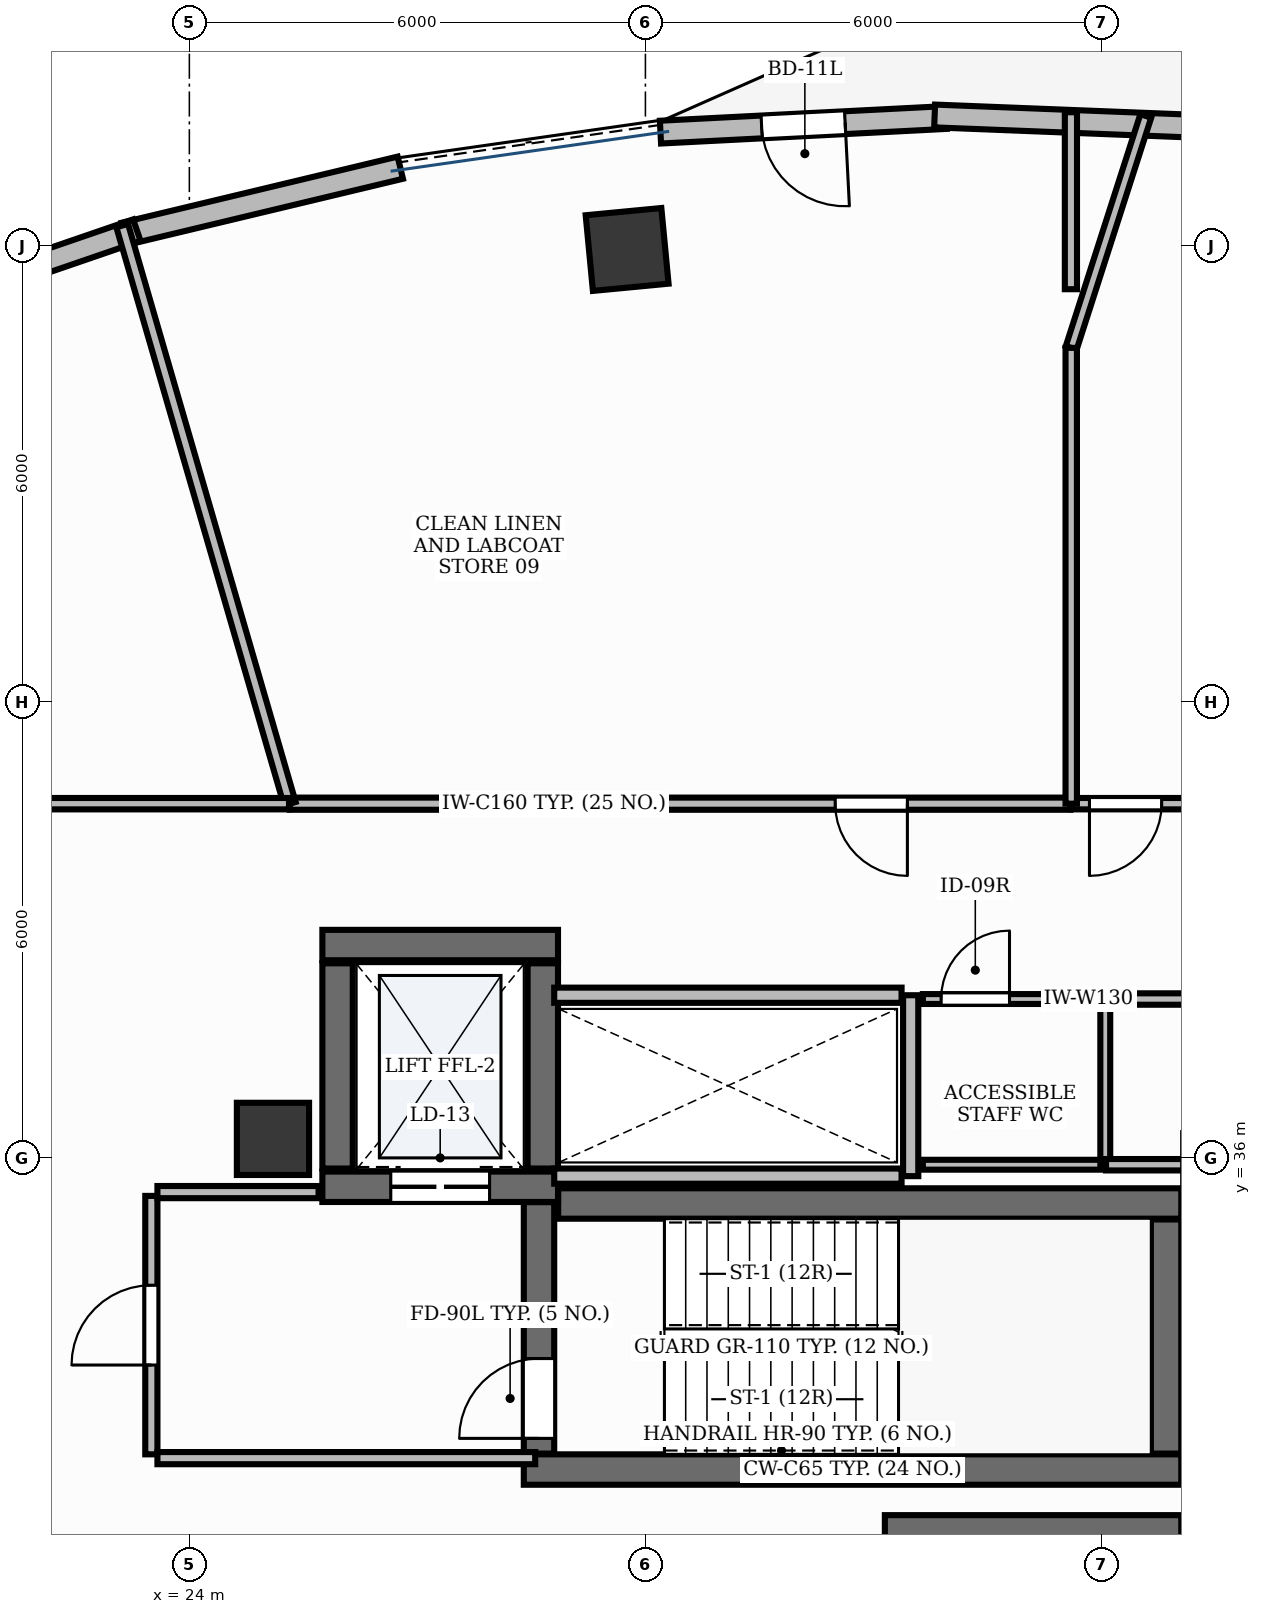
"""IFC4 building model, lengths in metres.
Left out: names, types, materials, properties, quantities, classifications, styles, units other than length and angle.
Written with IfcOpenShell. Run it as: python <this file> out.ifc"""

import sys

from ifc_helpers import new_model, si_unit, direction, frame, frame_2d, origin, origin_2d, place, context, subcontext, project, spatial, rectangle, extrude, element, fill, save


model = new_model("IFC4")
c1 = context("Model", 3, precision=1e-05, world=origin(), true_north=direction((0.0, 1.0)))
c2 = subcontext(c1, "Body", "Model", "MODEL_VIEW")
j1 = project(units=[si_unit("LENGTHUNIT", "METRE"), si_unit("PLANEANGLEUNIT", "RADIAN")], contexts=[c1])
p1 = place(None, origin())
s1 = spatial("IfcSite", under=j1, at=p1, CompositionType="ELEMENT")
p2 = place(p1, origin())
s2 = spatial("IfcBuilding", under=s1, at=p2, CompositionType="ELEMENT")
p3 = place(p2, frame((0.0, 0.0, 235.2)))
s3 = spatial("IfcBuildingStorey", under=s2, at=p3, CompositionType="ELEMENT", Elevation=235.2)
p4 = place(p3, frame((28.852, 35.4, 0.0), z_axis=(0.0, 0.0, 1.0), x_axis=(1.0, 0.0, 0.0)))
e1 = element("IfcWall", 1, at=p4, inside=s3, PredefinedType="SHEAR", context=c2, shape_type="SweptSolid", body=[
    extrude(rectangle(XDim=8.198, YDim=0.4, at=frame_2d((4.099, 0.0))), origin(), (0.0, 0.0, 1.0), 3.9),
])
p5 = place(p3, frame((28.4, 31.9, 0.0), z_axis=(0.0, 0.0, 1.0), x_axis=(1.0, 0.0, 0.0)))
e2 = element("IfcWall", 2, at=p5, inside=s3, PredefinedType="SHEAR", context=c2, shape_type="SweptSolid", body=[
    extrude(rectangle(XDim=8.65, YDim=0.4, at=frame_2d((4.325, 0.0))), origin(), (0.0, 0.0, 1.0), 3.9),
])
p6 = place(p3, frame((36.85, 32.11, 0.0), z_axis=(0.0, 0.0, 1.0), x_axis=(0.0, 1.0, 0.0)))
e3 = element("IfcWall", 3, at=p6, inside=s3, PredefinedType="SHEAR", context=c2, shape_type="SweptSolid", body=[
    extrude(rectangle(XDim=3.08, YDim=0.4, at=frame_2d((1.54, 0.0))), origin(), (0.0, 0.0, 1.0), 3.9),
])
p7 = place(p3, frame((28.6, 32.11, 0.0), z_axis=(0.0, 0.0, 1.0), x_axis=(0.0, 1.0, 0.0)))
e4 = element("IfcWall", 4, at=p7, inside=s3, PredefinedType="SHEAR", context=c2, shape_type="SweptSolid", body=[
    extrude(rectangle(XDim=3.308, YDim=0.4, at=frame_2d((1.654, 0.0))), origin(), (0.0, 0.0, 1.0), 3.9),
])
p8 = place(p7, frame((0.2, 0.0, 0.0)))
e5 = element("IfcOpeningElement", 5, at=p8, cuts=e4, PredefinedType="OPENING", context=c2, shape_type="SweptSolid", body=[
    extrude(rectangle(XDim=1.05, YDim=2.15, at=frame_2d((0.525, 1.075))), frame((0.0, 0.215, 0.0), z_axis=(0.0, -1.0, 0.0), x_axis=(1.0, 0.0, 0.0)), (0.0, 0.0, 1.0), 0.43),
])
p9 = place(p3, frame((33.15, 31.1, 0.0), z_axis=(0.0, 0.0, 1.0), x_axis=(1.0, 0.0, 0.0)))
e6 = element("IfcWall", 6, at=p9, inside=s3, PredefinedType="SHEAR", context=c2, shape_type="SweptSolid", body=[
    extrude(rectangle(XDim=3.9, YDim=0.4, at=frame_2d((1.95, 0.0))), origin(), (0.0, 0.0, 1.0), 3.9),
])
p10 = place(p3, frame((25.75, 38.8, 0.0), z_axis=(0.0, 0.0, 1.0), x_axis=(1.0, 0.0, 0.0)))
e7 = element("IfcWall", 7, at=p10, inside=s3, PredefinedType="SHEAR", context=c2, shape_type="SweptSolid", body=[
    extrude(rectangle(XDim=3.1, YDim=0.4, at=frame_2d((1.55, 0.0))), origin(), (0.0, 0.0, 1.0), 3.9),
])
p11 = place(p3, frame((25.75, 35.62, 0.0), z_axis=(0.0, 0.0, 1.0), x_axis=(1.0, 0.0, 0.0)))
e8 = element("IfcWall", 8, at=p11, inside=s3, PredefinedType="SHEAR", context=c2, shape_type="SweptSolid", body=[
    extrude(rectangle(XDim=3.1, YDim=0.4, at=frame_2d((1.55, 0.0))), origin(), (0.0, 0.0, 1.0), 3.9),
])
p12 = place(p11, frame((0.9, 0.0, 0.0)))
e9 = element("IfcOpeningElement", 9, at=p12, cuts=e8, PredefinedType="OPENING", context=c2, shape_type="SweptSolid", body=[
    extrude(rectangle(XDim=1.3, YDim=2.2, at=frame_2d((0.65, 1.1))), frame((0.0, 0.215, 0.0), z_axis=(0.0, -1.0, 0.0), x_axis=(1.0, 0.0, 0.0)), (0.0, 0.0, 1.0), 0.43),
])
for number, where, z_axis, x_axis in (
    (10, (25.95, 35.86, 0.0), (0.0, 0.0, 1.0), (0.0, 1.0, 0.0)),
    (11, (28.65, 35.86, 0.0), (0.0, 0.0, 1.0), (0.0, 1.0, 0.0)),
):
    element("IfcWall", number, at=place(p3, frame(where, z_axis=z_axis, x_axis=x_axis)), inside=s3, PredefinedType="SHEAR", context=c2, shape_type="SweptSolid", body=[
        extrude(rectangle(XDim=2.7, YDim=0.4, at=frame_2d((1.35, 0.0))), origin(), (0.0, 0.0, 1.0), 3.9),
    ])
p13 = place(p3, frame((25.1, 36.25, -0.0), z_axis=(0.0, 0.0, 1.0), x_axis=(1.0, 0.0, 0.0)))
e12 = element("IfcColumn", 12, at=p13, inside=s3, PredefinedType="PILASTER", context=c2, shape_type="SweptSolid", body=[
    extrude(rectangle(XDim=0.95, YDim=0.95, at=origin_2d()), origin(), (0.0, 0.0, 1.0), 3.901),
])
p14 = place(p3, frame((29.759, 47.951, -0.0), z_axis=(0.0, 0.0, 1.0), x_axis=(0.995462868748, 0.095150811579, 0.0)))
e13 = element("IfcColumn", 13, at=p14, inside=s3, PredefinedType="COLUMN", context=c2, shape_type="SweptSolid", body=[
    extrude(rectangle(XDim=1.0, YDim=1.0, at=origin_2d()), origin(), (0.0, 0.0, 1.0), 3.901),
])
p15 = place(p3, frame((33.958, 49.688, 0.0), z_axis=(0.0, 0.0, 1.0), x_axis=(-0.998693948377, -0.051092049037, 0.0)))
e14 = element("IfcWall", 14, at=p15, inside=s3, PredefinedType="STANDARD", context=c2, shape_type="SweptSolid", body=[
    extrude(rectangle(XDim=3.765, YDim=0.3, at=frame_2d((1.883, 0.0))), origin(), (0.0, 0.0, 1.0), 3.9),
])
p16 = place(p15, frame((1.333, 0.0, 0.0)))
e15 = element("IfcOpeningElement", 15, at=p16, cuts=e14, PredefinedType="OPENING", context=c2, shape_type="SweptSolid", body=[
    extrude(rectangle(XDim=1.1, YDim=2.15, at=frame_2d((0.55, 1.075))), frame((0.0, 0.165, 0.0), z_axis=(0.0, -1.0, 0.0), x_axis=(1.0, 0.0, 0.0)), (0.0, 0.0, 1.0), 0.33),
])
p17 = place(p3, frame((37.609, 49.557, 0.0), z_axis=(0.0, 0.0, 1.0), x_axis=(-0.999221923177, 0.039440439173, 0.0)))
e16 = element("IfcWall", 16, at=p17, inside=s3, PredefinedType="STANDARD", context=c2, shape_type="SweptSolid", body=[
    extrude(rectangle(XDim=3.807, YDim=0.3, at=frame_2d((1.903, 0.0))), origin(), (0.0, 0.0, 1.0), 3.9),
])
p18 = place(p3, frame((26.775, 49.027, 0.0), z_axis=(0.0, 0.0, 1.0), x_axis=(-0.972475629939, -0.233004611918, 0.0)))
e17 = element("IfcWall", 17, at=p18, inside=s3, PredefinedType="STANDARD", context=c2, shape_type="SweptSolid", body=[
    extrude(rectangle(XDim=3.735, YDim=0.3, at=frame_2d((1.868, 0.0))), origin(), (0.0, 0.0, 1.0), 3.9),
])
p19 = place(p3, frame((23.309, 48.205, 0.0), z_axis=(0.0, 0.0, 1.0), x_axis=(-0.945722383555, -0.32497565023, 0.0)))
e18 = element("IfcWall", 18, at=p19, inside=s3, PredefinedType="STANDARD", context=c2, shape_type="SweptSolid", body=[
    extrude(rectangle(XDim=3.67, YDim=0.3, at=frame_2d((1.835, 0.0))), origin(), (0.0, 0.0, 1.0), 3.47),
])
p20 = place(p3, frame((33.49, 35.76, 0.0), z_axis=(0.0, 0.0, 1.0), x_axis=(0.0, 1.0, 0.0)))
e19 = element("IfcWall", 19, at=p20, inside=s3, PredefinedType="PARTITIONING", context=c2, shape_type="SweptSolid", body=[
    extrude(rectangle(XDim=2.38, YDim=0.2, at=frame_2d((1.19, 0.0))), origin(), (0.0, 0.0, 1.0), 2.91),
])
for number, where, z_axis, x_axis in (
    (20, (28.8, 35.76, 0.0), (0.0, 0.0, 1.0), (1.0, 0.0, 0.0)),
    (21, (28.8, 38.14, 0.0), (0.0, 0.0, 1.0), (1.0, 0.0, 0.0)),
):
    element("IfcWall", number, at=place(p3, frame(where, z_axis=z_axis, x_axis=x_axis)), inside=s3, PredefinedType="PARTITIONING", context=c2, shape_type="SweptSolid", body=[
        extrude(rectangle(XDim=4.57, YDim=0.2, at=frame_2d((2.285, 0.0))), origin(), (0.0, 0.0, 1.0), 2.91),
    ])
p21 = place(p3, frame((23.5, 32.1, 0.0), z_axis=(0.0, 0.0, 1.0), x_axis=(0.0, 1.0, 0.0)))
e22 = element("IfcWall", 22, at=p21, inside=s3, PredefinedType="PARTITIONING", context=c2, shape_type="SweptSolid", body=[
    extrude(rectangle(XDim=3.4, YDim=0.16, at=frame_2d((1.7, 0.0))), origin(), (0.0, 0.0, 1.0), 2.91),
])
p22 = place(p21, frame((1.175, 0.0, 0.0)))
e23 = element("IfcOpeningElement", 23, at=p22, cuts=e22, PredefinedType="OPENING", context=c2, shape_type="SweptSolid", body=[
    extrude(rectangle(XDim=1.05, YDim=2.15, at=frame_2d((0.525, 1.075))), frame((0.0, 0.095, 0.0), z_axis=(0.0, -1.0, 0.0), x_axis=(1.0, 0.0, 0.0)), (0.0, 0.0, 1.0), 0.19),
])
p23 = place(p3, frame((23.58, 32.05, 0.0), z_axis=(0.0, 0.0, 1.0), x_axis=(1.0, 0.0, 0.0)))
e24 = element("IfcWall", 24, at=p23, inside=s3, PredefinedType="PARTITIONING", context=c2, shape_type="SweptSolid", body=[
    extrude(rectangle(XDim=4.97, YDim=0.16, at=frame_2d((2.485, 0.0))), origin(), (0.0, 0.0, 1.0), 2.91),
])
p24 = place(p3, frame((23.58, 35.55, 0.0), z_axis=(0.0, 0.0, 1.0), x_axis=(1.0, 0.0, 0.0)))
e25 = element("IfcWall", 25, at=p24, inside=s3, PredefinedType="PARTITIONING", context=c2, shape_type="SweptSolid", body=[
    extrude(rectangle(XDim=2.12, YDim=0.16, at=frame_2d((1.06, 0.0))), origin(), (0.0, 0.0, 1.0), 2.91),
])
p25 = place(p3, frame((33.65, 38.09, 0.0), z_axis=(0.0, 0.0, 1.0), x_axis=(1.0, 0.0, 0.0)))
e26 = element("IfcWall", 26, at=p25, inside=s3, PredefinedType="PARTITIONING", context=c2, shape_type="SweptSolid", body=[
    extrude(rectangle(XDim=2.4, YDim=0.13, at=frame_2d((1.2, 0.0))), origin(), (0.0, 0.0, 1.0), 2.91),
])
p26 = place(p25, frame((0.24, 0.0, 0.0)))
e27 = element("IfcOpeningElement", 27, at=p26, cuts=e26, PredefinedType="OPENING", context=c2, shape_type="SweptSolid", body=[
    extrude(rectangle(XDim=0.9, YDim=2.15, at=frame_2d((0.45, 1.075))), frame((0.0, 0.08, 0.0), z_axis=(0.0, -1.0, 0.0), x_axis=(1.0, 0.0, 0.0)), (0.0, 0.0, 1.0), 0.16),
])
p27 = place(p3, frame((37.2, 40.66, 0.0), z_axis=(0.0, 0.0, 1.0), x_axis=(-1.0, 0.0, 0.0)))
e28 = element("IfcWall", 28, at=p27, inside=s3, PredefinedType="PARTITIONING", context=c2, shape_type="SweptSolid", body=[
    extrude(rectangle(XDim=1.598, YDim=0.15, at=frame_2d((0.799, 0.0))), origin(), (0.0, 0.0, 1.0), 2.91),
])
p28 = place(p27, frame((0.408, 0.0, 0.0)))
e29 = element("IfcOpeningElement", 29, at=p28, cuts=e28, PredefinedType="OPENING", context=c2, shape_type="SweptSolid", body=[
    extrude(rectangle(XDim=0.95, YDim=2.15, at=frame_2d((0.475, 1.075))), frame((0.0, 0.09, 0.0), z_axis=(0.0, -1.0, 0.0), x_axis=(1.0, 0.0, 0.0)), (0.0, 0.0, 1.0), 0.18),
])
p29 = place(p3, frame((35.592, 40.66, 0.0), z_axis=(0.0, 0.0, 1.0), x_axis=(-1.0, 0.0, 0.0)))
e30 = element("IfcWall", 30, at=p29, inside=s3, PredefinedType="PARTITIONING", context=c2, shape_type="SweptSolid", body=[
    extrude(rectangle(XDim=10.271, YDim=0.16, at=frame_2d((5.135, 0.0))), origin(), (0.0, 0.0, 1.0), 2.91),
])
p30 = place(p29, frame((2.146, 0.0, 0.0)))
e31 = element("IfcOpeningElement", 31, at=p30, cuts=e30, PredefinedType="OPENING", context=c2, shape_type="SweptSolid", body=[
    extrude(rectangle(XDim=0.95, YDim=2.15, at=frame_2d((0.475, 1.075))), frame((0.0, 0.095, 0.0), z_axis=(0.0, -1.0, 0.0), x_axis=(1.0, 0.0, 0.0)), (0.0, 0.0, 1.0), 0.19),
])
p31 = place(p3, frame((36.05, 35.91, 0.0), z_axis=(0.0, 0.0, 1.0), x_axis=(-1.0, 0.0, 0.0)))
e32 = element("IfcWall", 32, at=p31, inside=s3, PredefinedType="PARTITIONING", context=c2, shape_type="SweptSolid", body=[
    extrude(rectangle(XDim=2.4, YDim=0.13, at=frame_2d((1.2, 0.0))), origin(), (0.0, 0.0, 1.0), 2.91),
])
p32 = place(p3, frame((36.05, 38.09, 0.0), z_axis=(0.0, 0.0, 1.0), x_axis=(0.0, -1.0, 0.0)))
e33 = element("IfcWall", 33, at=p32, inside=s3, PredefinedType="PARTITIONING", context=c2, shape_type="SweptSolid", body=[
    extrude(rectangle(XDim=2.18, YDim=0.13, at=frame_2d((1.09, 0.0))), origin(), (0.0, 0.0, 1.0), 2.91),
])
p33 = place(p3, frame((35.602, 46.657, 0.0), z_axis=(0.0, 0.0, 1.0), x_axis=(0.306063425715, 0.95201112359, 0.0)))
e34 = element("IfcWall", 34, at=p33, inside=s3, PredefinedType="PARTITIONING", context=c2, shape_type="SweptSolid", body=[
    extrude(rectangle(XDim=3.205, YDim=0.15, at=frame_2d((1.603, 0.0))), origin(), (0.0, 0.0, 1.0), 2.91),
])
p34 = place(p3, frame((37.35, 35.91, 0.0), z_axis=(0.0, 0.0, 1.0), x_axis=(-1.0, 0.0, 0.0)))
e35 = element("IfcWall", 35, at=p34, inside=s3, PredefinedType="PARTITIONING", context=c2, shape_type="SweptSolid", body=[
    extrude(rectangle(XDim=1.29, YDim=0.15, at=frame_2d((0.645, 0.0))), origin(), (0.0, 0.0, 1.0), 2.91),
])
p35 = place(p3, frame((36.06, 38.09, 0.0), z_axis=(0.0, 0.0, 1.0), x_axis=(1.0, 0.0, 0.0)))
e36 = element("IfcWall", 36, at=p35, inside=s3, PredefinedType="PARTITIONING", context=c2, shape_type="SweptSolid", body=[
    extrude(rectangle(XDim=1.14, YDim=0.15, at=frame_2d((0.57, 0.0))), origin(), (0.0, 0.0, 1.0), 2.91),
])
p36 = place(p3, frame((35.602, 40.66, 0.0), z_axis=(0.0, 0.0, 1.0), x_axis=(0.0, 1.0, 0.0)))
e37 = element("IfcWall", 37, at=p36, inside=s3, PredefinedType="PARTITIONING", context=c2, shape_type="SweptSolid", body=[
    extrude(rectangle(XDim=5.997, YDim=0.15, at=frame_2d((2.998, 0.0))), origin(), (0.0, 0.0, 1.0), 2.91),
])
p37 = place(p3, frame((35.598, 49.757, 0.0), z_axis=(0.0, 0.0, 1.0), x_axis=(0.0, -1.0, 0.0)))
e38 = element("IfcWall", 38, at=p37, inside=s3, PredefinedType="PARTITIONING", context=c2, shape_type="SweptSolid", body=[
    extrude(rectangle(XDim=2.328, YDim=0.16, at=frame_2d((1.164, 0.0))), origin(), (0.0, 0.0, 1.0), 2.91),
])
p38 = place(p3, frame((25.322, 40.66, 0.0), z_axis=(0.0, 0.0, 1.0), x_axis=(-0.278465296123, 0.960446291499, 0.0)))
e39 = element("IfcWall", 39, at=p38, inside=s3, PredefinedType="PARTITIONING", context=c2, shape_type="SweptSolid", body=[
    extrude(rectangle(XDim=7.919, YDim=0.16, at=frame_2d((3.959, 0.0))), origin(), (0.0, 0.0, 1.0), 2.91),
])
p39 = place(p3, frame((25.311, 40.66, 0.0), z_axis=(0.0, 0.0, 1.0), x_axis=(-1.0, 0.0, 0.0)))
e40 = element("IfcWall", 40, at=p39, inside=s3, PredefinedType="PARTITIONING", context=c2, shape_type="SweptSolid", body=[
    extrude(rectangle(XDim=3.561, YDim=0.15, at=frame_2d((1.781, 0.0))), origin(), (0.0, 0.0, 1.0), 2.91),
])
p40 = place(p16, origin())
e41 = element("IfcDoor", 41, at=p40, inside=s3, OperationType="SINGLE_SWING_LEFT", PredefinedType="DOOR", context=c2, shape_type="SweptSolid", body=[
    extrude(rectangle(XDim=1.1, YDim=2.15, at=frame_2d((0.55, 1.075))), frame((0.0, 0.025, 0.0), z_axis=(0.0, -1.0, 0.0), x_axis=(1.0, 0.0, 0.0)), (0.0, 0.0, 1.0), 0.05),
])
fill(e15, e41)
p41 = place(p8, origin())
e42 = element("IfcDoor", 42, at=p41, inside=s3, OperationType="SINGLE_SWING_LEFT", PredefinedType="DOOR", context=c2, shape_type="SweptSolid", body=[
    extrude(rectangle(XDim=1.05, YDim=2.15, at=frame_2d((0.525, 1.075))), frame((0.0, 0.025, 0.0), z_axis=(0.0, -1.0, 0.0), x_axis=(1.0, 0.0, 0.0)), (0.0, 0.0, 1.0), 0.05),
])
fill(e5, e42)
p42 = place(p12, origin())
e43 = element("IfcDoor", 43, at=p42, inside=s3, OperationType="DOUBLE_DOOR_SLIDING", PredefinedType="DOOR", context=c2, shape_type="SweptSolid", body=[
    extrude(rectangle(XDim=1.3, YDim=2.2, at=frame_2d((0.65, 1.1))), frame((0.0, 0.025, 0.0), z_axis=(0.0, -1.0, 0.0), x_axis=(1.0, 0.0, 0.0)), (0.0, 0.0, 1.0), 0.05),
])
fill(e9, e43)
p43 = place(p22, origin())
e44 = element("IfcDoor", 44, at=p43, inside=s3, OperationType="SINGLE_SWING_LEFT", PredefinedType="DOOR", context=c2, shape_type="SweptSolid", body=[
    extrude(rectangle(XDim=1.05, YDim=2.15, at=frame_2d((0.525, 1.075))), frame((0.0, 0.025, 0.0), z_axis=(0.0, -1.0, 0.0), x_axis=(1.0, 0.0, 0.0)), (0.0, 0.0, 1.0), 0.05),
])
fill(e23, e44)
p44 = place(p26, origin())
e45 = element("IfcDoor", 45, at=p44, inside=s3, OperationType="SINGLE_SWING_RIGHT", PredefinedType="DOOR", context=c2, shape_type="SweptSolid", body=[
    extrude(rectangle(XDim=0.9, YDim=2.15, at=frame_2d((0.45, 1.075))), frame((0.0, 0.025, 0.0), z_axis=(0.0, -1.0, 0.0), x_axis=(1.0, 0.0, 0.0)), (0.0, 0.0, 1.0), 0.05),
])
fill(e27, e45)
p45 = place(p28, origin())
e46 = element("IfcDoor", 46, at=p45, inside=s3, OperationType="SINGLE_SWING_RIGHT", PredefinedType="DOOR", context=c2, shape_type="SweptSolid", body=[
    extrude(rectangle(XDim=0.95, YDim=2.15, at=frame_2d((0.475, 1.075))), frame((0.0, 0.025, 0.0), z_axis=(0.0, -1.0, 0.0), x_axis=(1.0, 0.0, 0.0)), (0.0, 0.0, 1.0), 0.05),
])
fill(e29, e46)
p46 = place(p30, origin())
e47 = element("IfcDoor", 47, at=p46, inside=s3, OperationType="SINGLE_SWING_LEFT", PredefinedType="DOOR", context=c2, shape_type="SweptSolid", body=[
    extrude(rectangle(XDim=0.95, YDim=2.15, at=frame_2d((0.475, 1.075))), frame((0.0, 0.025, 0.0), z_axis=(0.0, -1.0, 0.0), x_axis=(1.0, 0.0, 0.0)), (0.0, 0.0, 1.0), 0.05),
])
fill(e31, e47)
save(model, sys.argv[1])
